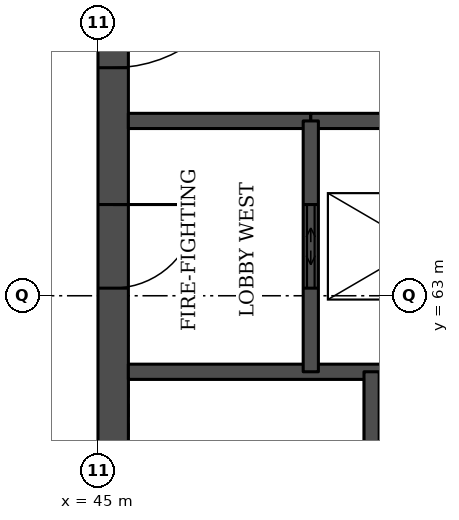
"""IFC4 building model, lengths in metres.
Left out: names, types, materials, properties, quantities, classifications, styles, units other than length and angle.
Written with IfcOpenShell. Run it as: python <this file> out.ifc"""

import sys

from ifc_helpers import new_model, si_unit, direction, frame, frame_2d, origin, place, context, subcontext, project, spatial, rectangle, extrude, element, fill, save


model = new_model("IFC4")
c1 = context("Model", 3, precision=1e-05, world=origin(), true_north=direction((0.0, 1.0)))
c2 = subcontext(c1, "Body", "Model", "MODEL_VIEW")
j1 = project(units=[si_unit("LENGTHUNIT", "METRE"), si_unit("PLANEANGLEUNIT", "RADIAN")], contexts=[c1])
p1 = place(None, origin())
s1 = spatial("IfcSite", under=j1, at=p1, CompositionType="ELEMENT")
p2 = place(p1, origin())
s2 = spatial("IfcBuilding", under=s1, at=p2, CompositionType="ELEMENT")
p3 = place(p2, frame((0.0, 0.0, 188.4)))
s3 = spatial("IfcBuildingStorey", under=s2, at=p3, CompositionType="ELEMENT", Elevation=188.4)
p4 = place(p3, frame((45.2, 49.5, 0.0), z_axis=(0.0, 0.0, 1.0), x_axis=(0.0, 1.0, 0.0)))
e1 = element("IfcWall", 1, at=p4, inside=s3, PredefinedType="SHEAR", context=c2, shape_type="SweptSolid", body=[
    extrude(rectangle(XDim=22.5, YDim=0.4, at=frame_2d((11.25, 0.0))), origin(), (0.0, 0.0, 1.0), 3.7),
])
p5 = place(p4, frame((4.2, 0.0, 0.0)))
e2 = element("IfcOpeningElement", 2, at=p5, cuts=e1, PredefinedType="OPENING", context=c2, shape_type="SweptSolid", body=[
    extrude(rectangle(XDim=1.8, YDim=2.1, at=frame_2d((0.9, 1.05))), frame((0.0, 0.21, 0.0), z_axis=(0.0, -1.0, 0.0), x_axis=(1.0, 0.0, 0.0)), (0.0, 0.0, 1.0), 0.42),
])
p6 = place(p4, frame((6.9, 0.0, 0.0)))
e3 = element("IfcOpeningElement", 3, at=p6, cuts=e1, PredefinedType="OPENING", context=c2, shape_type="SweptSolid", body=[
    extrude(rectangle(XDim=1.1, YDim=2.1, at=frame_2d((0.55, 1.05))), frame((0.0, 0.21, 0.0), z_axis=(0.0, -1.0, 0.0), x_axis=(1.0, 0.0, 0.0)), (0.0, 0.0, 1.0), 0.42),
])
p7 = place(p4, frame((13.6, 0.0, 0.0)))
e4 = element("IfcOpeningElement", 4, at=p7, cuts=e1, PredefinedType="OPENING", context=c2, shape_type="SweptSolid", body=[
    extrude(rectangle(XDim=1.1, YDim=2.1, at=frame_2d((0.55, 1.05))), frame((0.0, 0.21, 0.0), z_axis=(0.0, -1.0, 0.0), x_axis=(1.0, 0.0, 0.0)), (0.0, 0.0, 1.0), 0.42),
])
p8 = place(p4, frame((16.5, 0.0, 0.0)))
e5 = element("IfcOpeningElement", 5, at=p8, cuts=e1, PredefinedType="OPENING", context=c2, shape_type="SweptSolid", body=[
    extrude(rectangle(XDim=1.8, YDim=2.1, at=frame_2d((0.9, 1.05))), frame((0.0, 0.21, 0.0), z_axis=(0.0, -1.0, 0.0), x_axis=(1.0, 0.0, 0.0)), (0.0, 0.0, 1.0), 0.42),
])
p9 = place(p3, frame((45.4, 62.0, 0.0), z_axis=(0.0, 0.0, 1.0), x_axis=(1.0, 0.0, 0.0)))
e6 = element("IfcWall", 6, at=p9, inside=s3, PredefinedType="SOLIDWALL", context=c2, shape_type="SweptSolid", body=[
    extrude(rectangle(XDim=5.25, YDim=0.2, at=frame_2d((2.625, 0.0))), origin(), (0.0, 0.0, 1.0), 3.55),
])
p10 = place(p3, frame((45.4, 65.3, 0.0), z_axis=(0.0, 0.0, 1.0), x_axis=(1.0, 0.0, 0.0)))
e7 = element("IfcWall", 7, at=p10, inside=s3, PredefinedType="SOLIDWALL", context=c2, shape_type="SweptSolid", body=[
    extrude(rectangle(XDim=2.4, YDim=0.2, at=frame_2d((1.2, 0.0))), origin(), (0.0, 0.0, 1.0), 3.55),
])
p11 = place(p3, frame((47.8, 65.3, 0.0), z_axis=(0.0, 0.0, 1.0), x_axis=(1.0, 0.0, 0.0)))
e8 = element("IfcWall", 8, at=p11, inside=s3, PredefinedType="SOLIDWALL", context=c2, shape_type="SweptSolid", body=[
    extrude(rectangle(XDim=16.9, YDim=0.2, at=frame_2d((8.45, 0.0))), origin(), (0.0, 0.0, 1.0), 3.55),
])
p12 = place(p11, frame((3.65, 0.0, 0.0)))
e9 = element("IfcOpeningElement", 9, at=p12, cuts=e8, PredefinedType="OPENING", context=c2, shape_type="SweptSolid", body=[
    extrude(rectangle(XDim=1.2, YDim=2.1, at=frame_2d((0.6, 1.05))), frame((0.0, 0.11, 0.0), z_axis=(0.0, -1.0, 0.0), x_axis=(1.0, 0.0, 0.0)), (0.0, 0.0, 1.0), 0.22),
])
p13 = place(p11, frame((6.45, 0.0, 0.0)))
e10 = element("IfcOpeningElement", 10, at=p13, cuts=e8, PredefinedType="OPENING", context=c2, shape_type="SweptSolid", body=[
    extrude(rectangle(XDim=1.2, YDim=2.1, at=frame_2d((0.6, 1.05))), frame((0.0, 0.11, 0.0), z_axis=(0.0, -1.0, 0.0), x_axis=(1.0, 0.0, 0.0)), (0.0, 0.0, 1.0), 0.22),
])
p14 = place(p11, frame((9.25, 0.0, 0.0)))
e11 = element("IfcOpeningElement", 11, at=p14, cuts=e8, PredefinedType="OPENING", context=c2, shape_type="SweptSolid", body=[
    extrude(rectangle(XDim=1.2, YDim=2.1, at=frame_2d((0.6, 1.05))), frame((0.0, 0.11, 0.0), z_axis=(0.0, -1.0, 0.0), x_axis=(1.0, 0.0, 0.0)), (0.0, 0.0, 1.0), 0.22),
])
p15 = place(p11, frame((12.05, 0.0, 0.0)))
e12 = element("IfcOpeningElement", 12, at=p15, cuts=e8, PredefinedType="OPENING", context=c2, shape_type="SweptSolid", body=[
    extrude(rectangle(XDim=1.2, YDim=2.1, at=frame_2d((0.6, 1.05))), frame((0.0, 0.11, 0.0), z_axis=(0.0, -1.0, 0.0), x_axis=(1.0, 0.0, 0.0)), (0.0, 0.0, 1.0), 0.22),
])
p16 = place(p3, frame((47.8, 62.0, 0.0), z_axis=(0.0, 0.0, 1.0), x_axis=(0.0, 1.0, 0.0)))
e13 = element("IfcWall", 13, at=p16, inside=s3, PredefinedType="SOLIDWALL", context=c2, shape_type="SweptSolid", body=[
    extrude(rectangle(XDim=3.3, YDim=0.2, at=frame_2d((1.65, 0.0))), origin(), (0.0, 0.0, 1.0), 3.55),
])
p17 = place(p16, frame((1.1, 0.0, 0.0)))
e14 = element("IfcOpeningElement", 14, at=p17, cuts=e13, PredefinedType="OPENING", context=c2, shape_type="SweptSolid", body=[
    extrude(rectangle(XDim=1.1, YDim=2.1, at=frame_2d((0.55, 1.05))), frame((0.0, 0.11, 0.0), z_axis=(0.0, -1.0, 0.0), x_axis=(1.0, 0.0, 0.0)), (0.0, 0.0, 1.0), 0.22),
])
p18 = place(p3, frame((48.6, 56.2, 0.0), z_axis=(0.0, 0.0, 1.0), x_axis=(0.0, 1.0, 0.0)))
e15 = element("IfcWall", 15, at=p18, inside=s3, PredefinedType="SOLIDWALL", context=c2, shape_type="SweptSolid", body=[
    extrude(rectangle(XDim=5.8, YDim=0.2, at=frame_2d((2.9, 0.0))), origin(), (0.0, 0.0, 1.0), 3.55),
])
p19 = place(p17, origin())
e16 = element("IfcDoor", 16, at=p19, inside=s3, OperationType="DOUBLE_DOOR_SLIDING", PredefinedType="DOOR", context=c2, shape_type="SweptSolid", body=[
    extrude(rectangle(XDim=1.1, YDim=2.1, at=frame_2d((0.55, 1.05))), frame((0.0, 0.025, 0.0), z_axis=(0.0, -1.0, 0.0), x_axis=(1.0, 0.0, 0.0)), (0.0, 0.0, 1.0), 0.05),
])
fill(e14, e16)
p20 = place(p7, frame((1.1, 0.0, 0.0), z_axis=(0.0, 0.0, 1.0), x_axis=(-1.0, 0.0, 0.0)))
e17 = element("IfcDoor", 17, at=p20, inside=s3, OperationType="SINGLE_SWING_LEFT", PredefinedType="DOOR", context=c2, shape_type="SweptSolid", body=[
    extrude(rectangle(XDim=1.1, YDim=2.1, at=frame_2d((0.55, 1.05))), frame((0.0, 0.025, 0.0), z_axis=(0.0, -1.0, 0.0), x_axis=(1.0, 0.0, 0.0)), (0.0, 0.0, 1.0), 0.05),
])
fill(e4, e17)
p21 = place(p8, frame((1.8, 0.0, 0.0), z_axis=(0.0, 0.0, 1.0), x_axis=(-1.0, 0.0, 0.0)))
e18 = element("IfcDoor", 18, at=p21, inside=s3, OperationType="SINGLE_SWING_LEFT", PredefinedType="DOOR", context=c2, shape_type="SweptSolid", body=[
    extrude(rectangle(XDim=1.8, YDim=2.1, at=frame_2d((0.9, 1.05))), frame((0.0, 0.025, 0.0), z_axis=(0.0, -1.0, 0.0), x_axis=(1.0, 0.0, 0.0)), (0.0, 0.0, 1.0), 0.05),
])
fill(e5, e18)
save(model, sys.argv[1])
